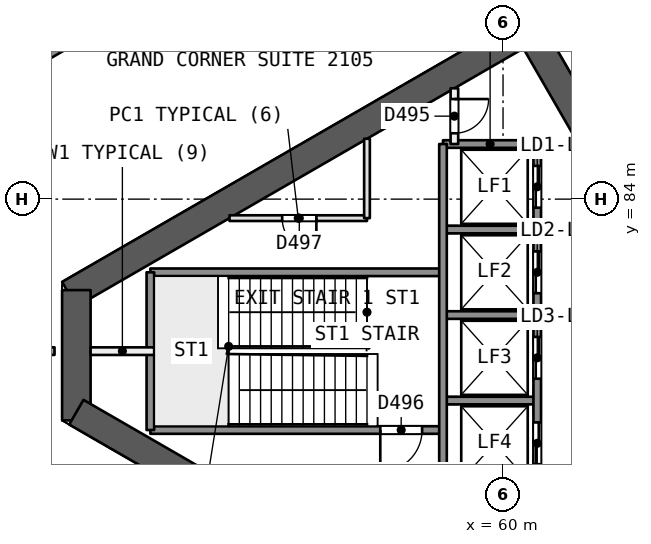
"""IFC4 building model, lengths in metres.
Left out: names, types, materials, properties, quantities, classifications, styles, units other than length and angle.
Written with IfcOpenShell. Run it as: python <this file> out.ifc"""

import sys

from ifc_helpers import new_model, si_unit, direction, frame, frame_2d, origin, place, context, subcontext, project, spatial, rectangle, extrude, element, fill, save


model = new_model("IFC4")
c1 = context("Model", 3, precision=1e-05, world=origin(), true_north=direction((0.0, 1.0)))
c2 = subcontext(c1, "Body", "Model", "MODEL_VIEW")
j1 = project(units=[si_unit("LENGTHUNIT", "METRE"), si_unit("PLANEANGLEUNIT", "RADIAN")], contexts=[c1])
p1 = place(None, origin())
s1 = spatial("IfcSite", under=j1, at=p1, CompositionType="ELEMENT")
p2 = place(p1, origin())
s2 = spatial("IfcBuilding", under=s1, at=p2, CompositionType="ELEMENT")
p3 = place(p2, frame((0.0, 0.0, 90.6)))
s3 = spatial("IfcBuildingStorey", under=s2, at=p3, CompositionType="ELEMENT", Elevation=90.6)
p4 = place(p3, frame((65.567, 80.0, 0.0), z_axis=(0.0, 0.0, 1.0), x_axis=(-0.499988615364, 0.866031976607, 0.0)))
e1 = element("IfcWall", 1, at=p4, inside=s3, PredefinedType="SHEAR", context=c2, shape_type="SweptSolid", body=[
    extrude(rectangle(XDim=10.163, YDim=0.75, at=frame_2d((5.082, 0.0))), origin(), (0.0, 0.0, 1.0), 3.7),
])
p5 = place(p4, frame((0.733, 0.0, 0.0)))
e2 = element("IfcOpeningElement", 2, at=p5, cuts=e1, PredefinedType="OPENING", context=c2, shape_type="SweptSolid", body=[
    extrude(rectangle(XDim=1.2, YDim=2.1, at=frame_2d((0.6, 1.05))), frame((0.0, 0.385, 0.0), z_axis=(0.0, -1.0, 0.0), x_axis=(1.0, 0.0, 0.0)), (0.0, 0.0, 1.0), 0.771),
])
p6 = place(p3, frame((60.673, 88.477, 0.0), z_axis=(0.0, 0.0, 1.0), x_axis=(-0.8660248072, -0.500001033313, 0.0)))
e3 = element("IfcWall", 3, at=p6, inside=s3, PredefinedType="SHEAR", context=c2, shape_type="SweptSolid", body=[
    extrude(rectangle(XDim=13.958, YDim=0.75, at=frame_2d((6.979, 0.0))), origin(), (0.0, 0.0, 1.0), 3.7),
])
p7 = place(p3, frame((48.772, 81.606, 0.0), z_axis=(0.0, 0.0, 1.0), x_axis=(0.0, -1.0, 0.0)))
e4 = element("IfcWall", 4, at=p7, inside=s3, PredefinedType="SHEAR", context=c2, shape_type="SweptSolid", body=[
    extrude(rectangle(XDim=3.429, YDim=0.75, at=frame_2d((1.714, 0.0))), origin(), (0.0, 0.0, 1.0), 3.7),
])
p8 = place(p3, frame((48.772, 78.394, 0.0), z_axis=(0.0, 0.0, 1.0), x_axis=(0.866028339916, -0.499994914436, 0.0)))
e5 = element("IfcWall", 5, at=p8, inside=s3, PredefinedType="SHEAR", context=c2, shape_type="SweptSolid", body=[
    extrude(rectangle(XDim=14.117, YDim=0.75, at=frame_2d((7.059, 0.0))), origin(), (0.0, 0.0, 1.0), 3.7),
])
p9 = place(p3, frame((60.673, 71.523, 0.0), z_axis=(0.0, 0.0, 1.0), x_axis=(0.499997052475, 0.866027105532, 0.0)))
e6 = element("IfcWall", 6, at=p9, inside=s3, PredefinedType="SHEAR", context=c2, shape_type="SweptSolid", body=[
    extrude(rectangle(XDim=10.005, YDim=0.75, at=frame_2d((5.002, 0.0))), origin(), (0.0, 0.0, 1.0), 3.7),
])
p10 = place(p9, frame((7.855, 0.0, 0.0)))
e7 = element("IfcOpeningElement", 7, at=p10, cuts=e6, PredefinedType="OPENING", context=c2, shape_type="SweptSolid", body=[
    extrude(rectangle(XDim=1.2, YDim=2.1, at=frame_2d((0.6, 1.05))), frame((0.0, 0.385, 0.0), z_axis=(0.0, -1.0, 0.0), x_axis=(1.0, 0.0, 0.0)), (0.0, 0.0, 1.0), 0.771),
])
p11 = place(p3, frame((39.763, 80.001, 0.0), z_axis=(0.0, 0.0, 1.0), x_axis=(1.0, 0.0, 0.0)))
e8 = element("IfcWall", 8, at=p11, inside=s3, PredefinedType="PARTITIONING", context=c2, shape_type="SweptSolid", body=[
    extrude(rectangle(XDim=8.435, YDim=0.2, at=frame_2d((4.218, 0.0))), origin(), (0.0, 0.0, 1.0), 3.2),
])
p12 = place(p3, frame((39.614, 82.983, 0.0), z_axis=(0.0, 0.0, 1.0), x_axis=(0.866024236478, 0.500002021829, 0.0)))
e9 = element("IfcWall", 9, at=p12, inside=s3, PredefinedType="SOLIDWALL", context=c2, shape_type="SweptSolid", body=[
    extrude(rectangle(XDim=58.307, YDim=0.3, at=frame_2d((29.154, 0.0))), origin(), (0.0, 0.0, 1.0), 3.2),
])
p13 = place(p12, frame((43.353, 0.0, 0.0)))
e10 = element("IfcOpeningElement", 10, at=p13, cuts=e9, PredefinedType="OPENING", context=c2, shape_type="SweptSolid", body=[
    extrude(rectangle(XDim=2.4, YDim=2.4, at=frame_2d((1.2, 1.2))), frame((0.0, 0.161, 0.0), z_axis=(0.0, -1.0, 0.0), x_axis=(1.0, 0.0, 0.0)), (0.0, 0.0, 1.0), 0.321),
])
p14 = place(p12, frame((12.554, 0.0, 0.0)))
e11 = element("IfcOpeningElement", 11, at=p14, cuts=e9, PredefinedType="OPENING", context=c2, shape_type="SweptSolid", body=[
    extrude(rectangle(XDim=2.4, YDim=2.4, at=frame_2d((1.2, 1.2))), frame((0.0, 0.161, 0.0), z_axis=(0.0, -1.0, 0.0), x_axis=(1.0, 0.0, 0.0)), (0.0, 0.0, 1.0), 0.321),
])
p15 = place(p12, frame((27.954, 0.0, 0.0)))
e12 = element("IfcOpeningElement", 12, at=p15, cuts=e9, PredefinedType="OPENING", context=c2, shape_type="SweptSolid", body=[
    extrude(rectangle(XDim=2.4, YDim=2.4, at=frame_2d((1.2, 1.2))), frame((0.0, 0.161, 0.0), z_axis=(0.0, -1.0, 0.0), x_axis=(1.0, 0.0, 0.0)), (0.0, 0.0, 1.0), 0.321),
])
p16 = place(p3, frame((90.11, 47.863, 0.0), z_axis=(0.0, 0.0, 1.0), x_axis=(-0.866024236478, 0.500002021829, 0.0)))
e13 = element("IfcWall", 13, at=p16, inside=s3, PredefinedType="SOLIDWALL", context=c2, shape_type="SweptSolid", body=[
    extrude(rectangle(XDim=58.307, YDim=0.3, at=frame_2d((29.154, 0.0))), origin(), (0.0, 0.0, 1.0), 3.2),
])
p17 = place(p16, frame((44.133, 0.0, 0.0)))
e14 = element("IfcOpeningElement", 14, at=p17, cuts=e13, PredefinedType="OPENING", context=c2, shape_type="SweptSolid", body=[
    extrude(rectangle(XDim=2.4, YDim=2.4, at=frame_2d((1.2, 1.2))), frame((0.0, 0.161, 0.0), z_axis=(0.0, -1.0, 0.0), x_axis=(1.0, 0.0, 0.0)), (0.0, 0.0, 1.0), 0.321),
])
p18 = place(p16, frame((22.498, 0.0, 0.0)))
e15 = element("IfcOpeningElement", 15, at=p18, cuts=e13, PredefinedType="OPENING", context=c2, shape_type="SweptSolid", body=[
    extrude(rectangle(XDim=2.4, YDim=2.4, at=frame_2d((1.2, 1.2))), frame((0.0, 0.161, 0.0), z_axis=(0.0, -1.0, 0.0), x_axis=(1.0, 0.0, 0.0)), (0.0, 0.0, 1.0), 0.321),
])
p19 = place(p16, frame((10.65, 0.0, 0.0)))
e16 = element("IfcOpeningElement", 16, at=p19, cuts=e13, PredefinedType="OPENING", context=c2, shape_type="SweptSolid", body=[
    extrude(rectangle(XDim=2.4, YDim=2.4, at=frame_2d((1.2, 1.2))), frame((0.0, 0.161, 0.0), z_axis=(0.0, -1.0, 0.0), x_axis=(1.0, 0.0, 0.0)), (0.0, 0.0, 1.0), 0.321),
])
p20 = place(p16, frame((29.812, 0.0, 0.9)))
e17 = element("IfcOpeningElement", 17, at=p20, cuts=e13, PredefinedType="OPENING", context=c2, shape_type="SweptSolid", body=[
    extrude(rectangle(XDim=1.8, YDim=1.5, at=frame_2d((0.9, 0.75))), frame((0.0, 0.161, 0.0), z_axis=(0.0, -1.0, 0.0), x_axis=(1.0, 0.0, 0.0)), (0.0, 0.0, 1.0), 0.321),
])
p21 = place(p16, frame((26.695, 0.0, 0.9)))
e18 = element("IfcOpeningElement", 18, at=p21, cuts=e13, PredefinedType="OPENING", context=c2, shape_type="SweptSolid", body=[
    extrude(rectangle(XDim=1.8, YDim=1.5, at=frame_2d((0.9, 0.75))), frame((0.0, 0.161, 0.0), z_axis=(0.0, -1.0, 0.0), x_axis=(1.0, 0.0, 0.0)), (0.0, 0.0, 1.0), 0.321),
])
p22 = place(p3, frame((60.9, 85.45, 0.0), z_axis=(0.0, 0.0, 1.0), x_axis=(-1.0, 0.0, 0.0)))
e19 = element("IfcWall", 19, at=p22, inside=s3, PredefinedType="SOLIDWALL", context=c2, shape_type="SweptSolid", body=[
    extrude(rectangle(XDim=2.48, YDim=0.2, at=frame_2d((1.24, 0.0))), origin(), (0.0, 0.0, 1.0), 3.2),
])
p23 = place(p3, frame((56.42, 83.5, 0.0), z_axis=(0.0, 0.0, 1.0), x_axis=(-1.0, 0.0, 0.0)))
e20 = element("IfcWall", 20, at=p23, inside=s3, PredefinedType="PARTITIONING", context=c2, shape_type="SweptSolid", body=[
    extrude(rectangle(XDim=3.618, YDim=0.15, at=frame_2d((1.809, 0.0))), origin(), (0.0, 0.0, 1.0), 3.2),
])
p24 = place(p23, frame((1.332, 0.0, 0.0)))
e21 = element("IfcOpeningElement", 21, at=p24, cuts=e20, PredefinedType="OPENING", context=c2, shape_type="SweptSolid", body=[
    extrude(rectangle(XDim=0.9, YDim=2.1, at=frame_2d((0.45, 1.05))), frame((0.0, 0.085, 0.0), z_axis=(0.0, -1.0, 0.0), x_axis=(1.0, 0.0, 0.0)), (0.0, 0.0, 1.0), 0.171),
])
p25 = place(p3, frame((60.9, 83.2, 0.0), z_axis=(0.0, 0.0, 1.0), x_axis=(-1.0, 0.0, 0.0)))
e22 = element("IfcWall", 22, at=p25, inside=s3, PredefinedType="SOLIDWALL", context=c2, shape_type="SweptSolid", body=[
    extrude(rectangle(XDim=2.48, YDim=0.2, at=frame_2d((1.24, 0.0))), origin(), (0.0, 0.0, 1.0), 3.2),
])
p26 = place(p3, frame((58.42, 82.075, 0.0), z_axis=(0.0, 0.0, 1.0), x_axis=(-1.0, 0.0, 0.0)))
e23 = element("IfcWall", 23, at=p26, inside=s3, PredefinedType="SOLIDWALL", context=c2, shape_type="SweptSolid", body=[
    extrude(rectangle(XDim=7.7, YDim=0.2, at=frame_2d((3.85, 0.0))), origin(), (0.0, 0.0, 1.0), 3.2),
])
p27 = place(p3, frame((60.9, 80.95, 0.0), z_axis=(0.0, 0.0, 1.0), x_axis=(-1.0, 0.0, 0.0)))
e24 = element("IfcWall", 24, at=p27, inside=s3, PredefinedType="SOLIDWALL", context=c2, shape_type="SweptSolid", body=[
    extrude(rectangle(XDim=2.48, YDim=0.2, at=frame_2d((1.24, 0.0))), origin(), (0.0, 0.0, 1.0), 3.2),
])
p28 = place(p3, frame((50.82, 80.0, 0.0), z_axis=(0.0, 0.0, 1.0), x_axis=(-1.0, 0.0, 0.0)))
e25 = element("IfcWall", 25, at=p28, inside=s3, PredefinedType="PARTITIONING", context=c2, shape_type="SweptSolid", body=[
    extrude(rectangle(XDim=1.673, YDim=0.2, at=frame_2d((0.836, 0.0))), origin(), (0.0, 0.0, 1.0), 3.2),
])
p29 = place(p3, frame((60.9, 78.7, 0.0), z_axis=(0.0, 0.0, 1.0), x_axis=(-1.0, 0.0, 0.0)))
e26 = element("IfcWall", 26, at=p29, inside=s3, PredefinedType="SOLIDWALL", context=c2, shape_type="SweptSolid", body=[
    extrude(rectangle(XDim=2.48, YDim=0.2, at=frame_2d((1.24, 0.0))), origin(), (0.0, 0.0, 1.0), 3.2),
])
p30 = place(p3, frame((58.42, 77.925, 0.0), z_axis=(0.0, 0.0, 1.0), x_axis=(-1.0, 0.0, 0.0)))
e27 = element("IfcWall", 27, at=p30, inside=s3, PredefinedType="SOLIDWALL", context=c2, shape_type="SweptSolid", body=[
    extrude(rectangle(XDim=7.7, YDim=0.2, at=frame_2d((3.85, 0.0))), origin(), (0.0, 0.0, 1.0), 3.2),
])
p31 = place(p30, frame((0.55, 0.0, 0.0)))
e28 = element("IfcOpeningElement", 28, at=p31, cuts=e27, PredefinedType="OPENING", context=c2, shape_type="SweptSolid", body=[
    extrude(rectangle(XDim=1.1, YDim=2.1, at=frame_2d((0.55, 1.05))), frame((0.0, 0.11, 0.0), z_axis=(0.0, -1.0, 0.0), x_axis=(1.0, 0.0, 0.0)), (0.0, 0.0, 1.0), 0.221),
])
p32 = place(p3, frame((60.9, 85.45, 0.0), z_axis=(0.0, 0.0, 1.0), x_axis=(0.0, -1.0, 0.0)))
e29 = element("IfcWall", 29, at=p32, inside=s3, PredefinedType="SOLIDWALL", context=c2, shape_type="SweptSolid", body=[
    extrude(rectangle(XDim=10.9, YDim=0.2, at=frame_2d((5.45, 0.0))), origin(), (0.0, 0.0, 1.0), 3.2),
])
p33 = place(p32, frame((0.575, 0.0, 0.0)))
e30 = element("IfcOpeningElement", 30, at=p33, cuts=e29, PredefinedType="OPENING", context=c2, shape_type="SweptSolid", body=[
    extrude(rectangle(XDim=1.1, YDim=2.1, at=frame_2d((0.55, 1.05))), frame((0.0, 0.11, 0.0), z_axis=(0.0, -1.0, 0.0), x_axis=(1.0, 0.0, 0.0)), (0.0, 0.0, 1.0), 0.221),
])
p34 = place(p32, frame((2.825, 0.0, 0.0)))
e31 = element("IfcOpeningElement", 31, at=p34, cuts=e29, PredefinedType="OPENING", context=c2, shape_type="SweptSolid", body=[
    extrude(rectangle(XDim=1.1, YDim=2.1, at=frame_2d((0.55, 1.05))), frame((0.0, 0.11, 0.0), z_axis=(0.0, -1.0, 0.0), x_axis=(1.0, 0.0, 0.0)), (0.0, 0.0, 1.0), 0.221),
])
p35 = place(p32, frame((5.075, 0.0, 0.0)))
e32 = element("IfcOpeningElement", 32, at=p35, cuts=e29, PredefinedType="OPENING", context=c2, shape_type="SweptSolid", body=[
    extrude(rectangle(XDim=1.1, YDim=2.1, at=frame_2d((0.55, 1.05))), frame((0.0, 0.11, 0.0), z_axis=(0.0, -1.0, 0.0), x_axis=(1.0, 0.0, 0.0)), (0.0, 0.0, 1.0), 0.221),
])
p36 = place(p32, frame((7.325, 0.0, 0.0)))
e33 = element("IfcOpeningElement", 33, at=p36, cuts=e29, PredefinedType="OPENING", context=c2, shape_type="SweptSolid", body=[
    extrude(rectangle(XDim=1.1, YDim=2.1, at=frame_2d((0.55, 1.05))), frame((0.0, 0.11, 0.0), z_axis=(0.0, -1.0, 0.0), x_axis=(1.0, 0.0, 0.0)), (0.0, 0.0, 1.0), 0.221),
])
p37 = place(p3, frame((58.72, 86.917, 0.0), z_axis=(0.0, 0.0, 1.0), x_axis=(0.0, -1.0, 0.0)))
e34 = element("IfcWall", 34, at=p37, inside=s3, PredefinedType="PARTITIONING", context=c2, shape_type="SweptSolid", body=[
    extrude(rectangle(XDim=1.467, YDim=0.2, at=frame_2d((0.733, 0.0))), origin(), (0.0, 0.0, 1.0), 3.2),
])
p38 = place(p37, frame((0.283, 0.0, 0.0)))
e35 = element("IfcOpeningElement", 35, at=p38, cuts=e34, PredefinedType="OPENING", context=c2, shape_type="SweptSolid", body=[
    extrude(rectangle(XDim=0.9, YDim=2.1, at=frame_2d((0.45, 1.05))), frame((0.0, 0.11, 0.0), z_axis=(0.0, -1.0, 0.0), x_axis=(1.0, 0.0, 0.0)), (0.0, 0.0, 1.0), 0.221),
])
p39 = place(p3, frame((58.42, 85.45, 0.0), z_axis=(0.0, 0.0, 1.0), x_axis=(0.0, -1.0, 0.0)))
e36 = element("IfcWall", 36, at=p39, inside=s3, PredefinedType="SOLIDWALL", context=c2, shape_type="SweptSolid", body=[
    extrude(rectangle(XDim=9.0, YDim=0.2, at=frame_2d((4.5, 0.0))), origin(), (0.0, 0.0, 1.0), 3.2),
])
p40 = place(p3, frame((56.42, 85.589, 0.0), z_axis=(0.0, 0.0, 1.0), x_axis=(0.0, -1.0, 0.0)))
e37 = element("IfcWall", 37, at=p40, inside=s3, PredefinedType="PARTITIONING", context=c2, shape_type="SweptSolid", body=[
    extrude(rectangle(XDim=2.089, YDim=0.15, at=frame_2d((1.044, 0.0))), origin(), (0.0, 0.0, 1.0), 3.2),
])
p41 = place(p3, frame((50.72, 82.075, 0.0), z_axis=(0.0, 0.0, 1.0), x_axis=(0.0, -1.0, 0.0)))
e38 = element("IfcWall", 38, at=p41, inside=s3, PredefinedType="SOLIDWALL", context=c2, shape_type="SweptSolid", body=[
    extrude(rectangle(XDim=4.15, YDim=0.2, at=frame_2d((2.075, 0.0))), origin(), (0.0, 0.0, 1.0), 3.2),
])
p42 = place(p33, origin())
e39 = element("IfcDoor", 39, at=p42, inside=s3, OperationType="SLIDING_TO_RIGHT", PredefinedType="NOTDEFINED", context=c2, shape_type="SweptSolid", body=[
    extrude(rectangle(XDim=1.1, YDim=2.1, at=frame_2d((0.55, 1.05))), frame((0.0, 0.025, 0.0), z_axis=(0.0, -1.0, 0.0), x_axis=(1.0, 0.0, 0.0)), (0.0, 0.0, 1.0), 0.05),
])
fill(e30, e39)
p43 = place(p34, origin())
e40 = element("IfcDoor", 40, at=p43, inside=s3, OperationType="SLIDING_TO_LEFT", PredefinedType="NOTDEFINED", context=c2, shape_type="SweptSolid", body=[
    extrude(rectangle(XDim=1.1, YDim=2.1, at=frame_2d((0.55, 1.05))), frame((0.0, 0.025, 0.0), z_axis=(0.0, -1.0, 0.0), x_axis=(1.0, 0.0, 0.0)), (0.0, 0.0, 1.0), 0.05),
])
fill(e31, e40)
p44 = place(p35, origin())
e41 = element("IfcDoor", 41, at=p44, inside=s3, OperationType="SLIDING_TO_RIGHT", PredefinedType="NOTDEFINED", context=c2, shape_type="SweptSolid", body=[
    extrude(rectangle(XDim=1.1, YDim=2.1, at=frame_2d((0.55, 1.05))), frame((0.0, 0.025, 0.0), z_axis=(0.0, -1.0, 0.0), x_axis=(1.0, 0.0, 0.0)), (0.0, 0.0, 1.0), 0.05),
])
fill(e32, e41)
p45 = place(p36, origin())
e42 = element("IfcDoor", 42, at=p45, inside=s3, OperationType="SLIDING_TO_LEFT", PredefinedType="NOTDEFINED", context=c2, shape_type="SweptSolid", body=[
    extrude(rectangle(XDim=1.1, YDim=2.1, at=frame_2d((0.55, 1.05))), frame((0.0, 0.025, 0.0), z_axis=(0.0, -1.0, 0.0), x_axis=(1.0, 0.0, 0.0)), (0.0, 0.0, 1.0), 0.05),
])
fill(e33, e42)
p46 = place(p38, origin())
e43 = element("IfcDoor", 43, at=p46, inside=s3, OperationType="SINGLE_SWING_LEFT", PredefinedType="NOTDEFINED", context=c2, shape_type="SweptSolid", body=[
    extrude(rectangle(XDim=0.9, YDim=2.1, at=frame_2d((0.45, 1.05))), frame((0.0, 0.025, 0.0), z_axis=(0.0, -1.0, 0.0), x_axis=(1.0, 0.0, 0.0)), (0.0, 0.0, 1.0), 0.05),
])
fill(e35, e43)
p47 = place(p31, origin())
e44 = element("IfcDoor", 44, at=p47, inside=s3, OperationType="SINGLE_SWING_RIGHT", PredefinedType="NOTDEFINED", context=c2, shape_type="SweptSolid", body=[
    extrude(rectangle(XDim=1.1, YDim=2.1, at=frame_2d((0.55, 1.05))), frame((0.0, 0.025, 0.0), z_axis=(0.0, -1.0, 0.0), x_axis=(1.0, 0.0, 0.0)), (0.0, 0.0, 1.0), 0.05),
])
fill(e28, e44)
p48 = place(p24, origin())
e45 = element("IfcDoor", 45, at=p48, inside=s3, OperationType="SINGLE_SWING_LEFT", PredefinedType="NOTDEFINED", context=c2, shape_type="SweptSolid", body=[
    extrude(rectangle(XDim=0.9, YDim=2.1, at=frame_2d((0.45, 1.05))), frame((0.0, 0.025, 0.0), z_axis=(0.0, -1.0, 0.0), x_axis=(1.0, 0.0, 0.0)), (0.0, 0.0, 1.0), 0.05),
])
fill(e21, e45)
save(model, sys.argv[1])
